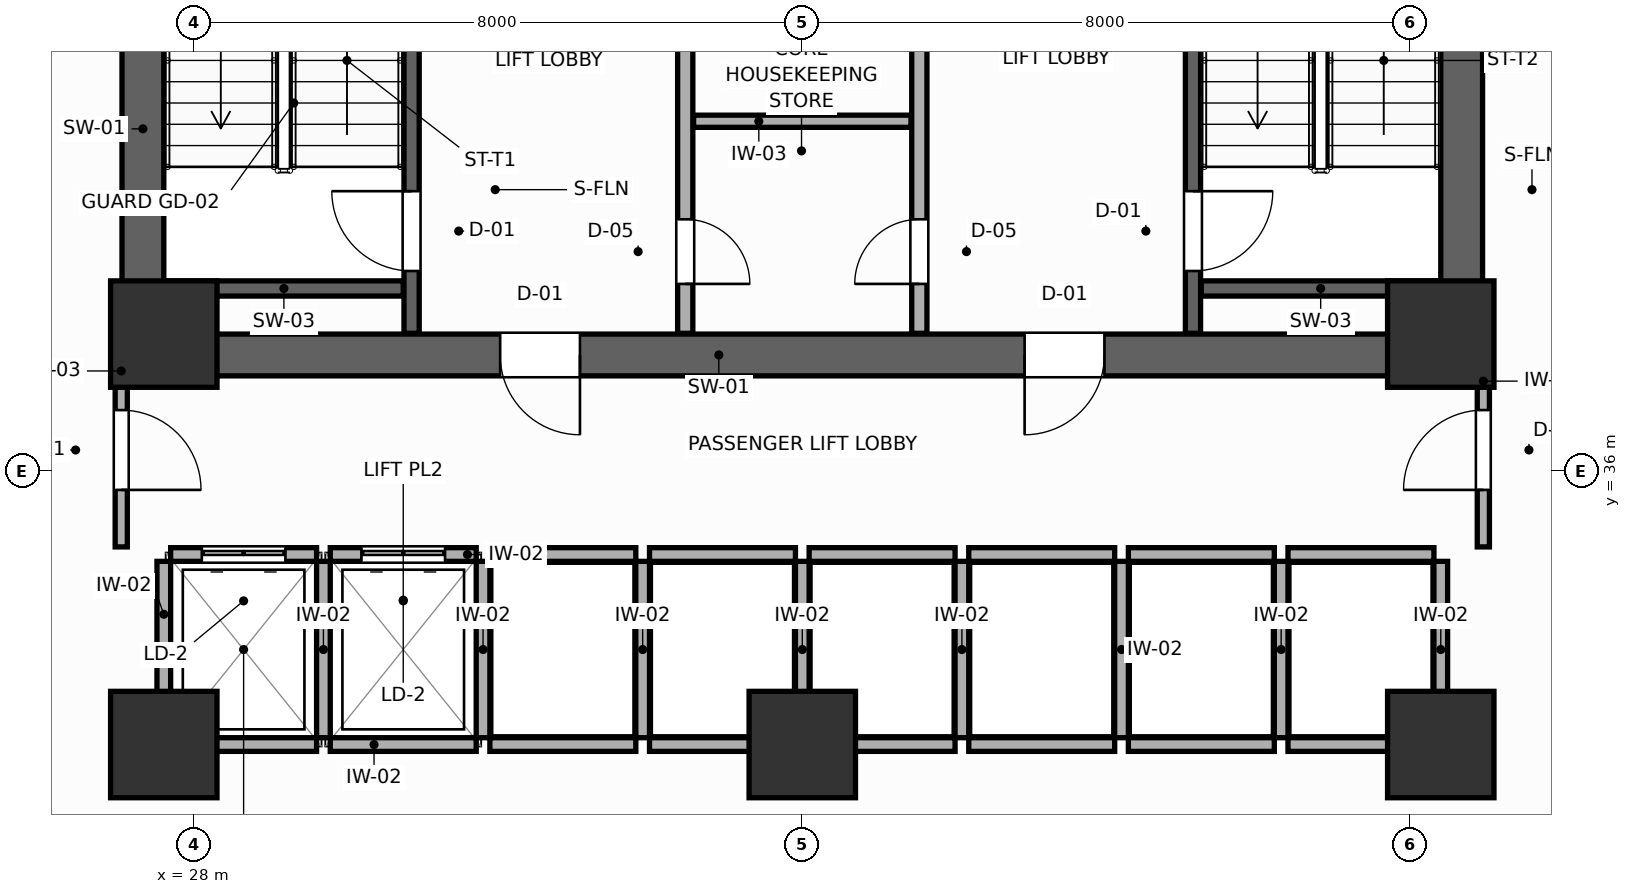
"""IFC4 building model, lengths in metres.
Left out: names, types, materials, properties, quantities, classifications, styles, units other than length and angle.
Written with IfcOpenShell. Run it as: python <this file> out.ifc"""

import sys

from ifc_helpers import new_model, si_unit, direction, frame, frame_2d, origin, origin_2d, place, context, subcontext, project, spatial, rectangle, extrude, source, transform, mapped, element, fill, save


model = new_model("IFC4")
c1 = context("Model", 3, precision=1e-05, world=origin(), true_north=direction((0.0, 1.0)))
c2 = subcontext(c1, "Body", "Model", "MODEL_VIEW")
j1 = project(units=[si_unit("LENGTHUNIT", "METRE"), si_unit("PLANEANGLEUNIT", "RADIAN")], contexts=[c1])
p1 = place(None, origin())
s1 = spatial("IfcSite", under=j1, at=p1, CompositionType="ELEMENT")
p2 = place(p1, origin())
s2 = spatial("IfcBuilding", under=s1, at=p2, CompositionType="ELEMENT")
p3 = place(p2, frame((0.0, 0.0, 83.4)))
s3 = spatial("IfcBuildingStorey", under=s2, at=p3, CompositionType="ELEMENT", Elevation=83.4)
p4 = place(p3, frame((27.05, 37.525, 0.0), z_axis=(0.0, 0.0, 1.0), x_axis=(1.0, 0.0, 0.0)))
e1 = element("IfcWall", 1, at=p4, inside=s3, PredefinedType="SHEAR", context=c2, shape_type="SweptSolid", body=[
    extrude(rectangle(XDim=17.9, YDim=0.55, at=frame_2d((8.95, 0.0))), origin(), (0.0, 0.0, 1.0), 3.9),
])
p5 = place(p4, frame((4.975, 0.0, 0.0)))
e2 = element("IfcOpeningElement", 2, at=p5, cuts=e1, PredefinedType="OPENING", context=c2, shape_type="SweptSolid", body=[
    extrude(rectangle(XDim=1.05, YDim=2.1, at=frame_2d((0.525, 1.05))), frame((0.0, 0.285, 0.0), z_axis=(0.0, -1.0, 0.0), x_axis=(1.0, 0.0, 0.0)), (0.0, 0.0, 1.0), 0.57),
])
p6 = place(p4, frame((11.875, 0.0, 0.0)))
e3 = element("IfcOpeningElement", 3, at=p6, cuts=e1, PredefinedType="OPENING", context=c2, shape_type="SweptSolid", body=[
    extrude(rectangle(XDim=1.05, YDim=2.1, at=frame_2d((0.525, 1.05))), frame((0.0, 0.285, 0.0), z_axis=(0.0, -1.0, 0.0), x_axis=(1.0, 0.0, 0.0)), (0.0, 0.0, 1.0), 0.57),
])
for number, where, z_axis, x_axis in (
    (4, (27.325, 37.8, 0.0), (0.0, 0.0, 1.0), (0.0, 1.0, 0.0)),
    (5, (44.675, 37.8, 0.0), (0.0, 0.0, 1.0), (0.0, 1.0, 0.0)),
):
    element("IfcWall", number, at=place(p3, frame(where, z_axis=z_axis, x_axis=x_axis)), inside=s3, PredefinedType="SHEAR", context=c2, shape_type="SweptSolid", body=[
        extrude(rectangle(XDim=9.0, YDim=0.55, at=frame_2d((4.5, 0.0))), origin(), (0.0, 0.0, 1.0), 3.9),
    ])
m1 = source(origin(), c2, "Body", "SweptSolid", [
    extrude(rectangle(XDim=1.4, YDim=1.4, at=origin_2d()), origin(), (0.0, 0.0, 1.0), 3.9),
])
for number, where, z_axis, x_axis in (
    (6, (27.6, 37.8, 0.0), (0.0, 0.0, 1.0), (1.0, 0.0, 0.0)),
    (7, (44.4, 37.8, 0.0), (0.0, 0.0, 1.0), (1.0, 0.0, 0.0)),
    (8, (27.6, 32.4, 0.0), (0.0, 0.0, 1.0), (1.0, 0.0, 0.0)),
    (9, (44.4, 32.4, 0.0), (0.0, 0.0, 1.0), (1.0, 0.0, 0.0)),
    (10, (36.0, 32.4, 0.0), (0.0, 0.0, 1.0), (1.0, 0.0, 0.0)),
):
    element("IfcColumn", number, at=place(p3, frame(where, z_axis=z_axis, x_axis=x_axis)), inside=s3, PredefinedType="COLUMN", context=c2, shape_type="MappedRepresentation", body=[
        mapped(m1, transform((0.0, 0.0, 0.0), scale=1.0)),
    ])
p7 = place(p3, frame((30.86, 37.81, 0.0), z_axis=(0.0, 0.0, 1.0), x_axis=(0.0, 1.0, 0.0)))
e11 = element("IfcWall", 11, at=p7, inside=s3, PredefinedType="SHEAR", context=c2, shape_type="SweptSolid", body=[
    extrude(rectangle(XDim=8.98, YDim=0.2, at=frame_2d((4.49, 0.0))), origin(), (0.0, 0.0, 1.0), 3.9),
])
p8 = place(p7, frame((0.82, 0.0, 0.0)))
e12 = element("IfcOpeningElement", 12, at=p8, cuts=e11, PredefinedType="OPENING", context=c2, shape_type="SweptSolid", body=[
    extrude(rectangle(XDim=1.05, YDim=2.1, at=frame_2d((0.525, 1.05))), frame((0.0, 0.11, 0.0), z_axis=(0.0, -1.0, 0.0), x_axis=(1.0, 0.0, 0.0)), (0.0, 0.0, 1.0), 0.22),
])
p9 = place(p3, frame((27.61, 38.4, 0.0), z_axis=(0.0, 0.0, 1.0), x_axis=(1.0, 0.0, 0.0)))
e13 = element("IfcWall", 13, at=p9, inside=s3, PredefinedType="SHEAR", context=c2, shape_type="SweptSolid", body=[
    extrude(rectangle(XDim=3.14, YDim=0.2, at=frame_2d((1.57, 0.0))), origin(), (0.0, 0.0, 1.0), 3.9),
])
p10 = place(p3, frame((41.14, 37.81, 0.0), z_axis=(0.0, 0.0, 1.0), x_axis=(0.0, 1.0, 0.0)))
e14 = element("IfcWall", 14, at=p10, inside=s3, PredefinedType="SHEAR", context=c2, shape_type="SweptSolid", body=[
    extrude(rectangle(XDim=8.98, YDim=0.2, at=frame_2d((4.49, 0.0))), origin(), (0.0, 0.0, 1.0), 3.9),
])
p11 = place(p10, frame((0.82, 0.0, 0.0)))
e15 = element("IfcOpeningElement", 15, at=p11, cuts=e14, PredefinedType="OPENING", context=c2, shape_type="SweptSolid", body=[
    extrude(rectangle(XDim=1.05, YDim=2.1, at=frame_2d((0.525, 1.05))), frame((0.0, 0.11, 0.0), z_axis=(0.0, -1.0, 0.0), x_axis=(1.0, 0.0, 0.0)), (0.0, 0.0, 1.0), 0.22),
])
p12 = place(p3, frame((41.25, 38.4, 0.0), z_axis=(0.0, 0.0, 1.0), x_axis=(1.0, 0.0, 0.0)))
e16 = element("IfcWall", 16, at=p12, inside=s3, PredefinedType="SHEAR", context=c2, shape_type="SweptSolid", body=[
    extrude(rectangle(XDim=3.14, YDim=0.2, at=frame_2d((1.57, 0.0))), origin(), (0.0, 0.0, 1.0), 3.9),
])
p13 = place(p3, frame((34.46, 37.81, 0.0), z_axis=(0.0, 0.0, 1.0), x_axis=(0.0, 1.0, 0.0)))
e17 = element("IfcWall", 17, at=p13, inside=s3, PredefinedType="PARTITIONING", context=c2, shape_type="SweptSolid", body=[
    extrude(rectangle(XDim=8.98, YDim=0.2, at=frame_2d((4.49, 0.0))), origin(), (0.0, 0.0, 1.0), 3.68),
])
p14 = place(p13, frame((0.65, 0.0, 0.0)))
e18 = element("IfcOpeningElement", 18, at=p14, cuts=e17, PredefinedType="OPENING", context=c2, shape_type="SweptSolid", body=[
    extrude(rectangle(XDim=0.85, YDim=2.05, at=frame_2d((0.425, 1.025))), frame((0.0, 0.11, 0.0), z_axis=(0.0, -1.0, 0.0), x_axis=(1.0, 0.0, 0.0)), (0.0, 0.0, 1.0), 0.22),
])
p15 = place(p3, frame((37.54, 37.81, 0.0), z_axis=(0.0, 0.0, 1.0), x_axis=(0.0, 1.0, 0.0)))
e19 = element("IfcWall", 19, at=p15, inside=s3, PredefinedType="PARTITIONING", context=c2, shape_type="SweptSolid", body=[
    extrude(rectangle(XDim=8.98, YDim=0.2, at=frame_2d((4.49, 0.0))), origin(), (0.0, 0.0, 1.0), 3.68),
])
p16 = place(p15, frame((0.65, 0.0, 0.0)))
e20 = element("IfcOpeningElement", 20, at=p16, cuts=e19, PredefinedType="OPENING", context=c2, shape_type="SweptSolid", body=[
    extrude(rectangle(XDim=0.85, YDim=2.05, at=frame_2d((0.425, 1.025))), frame((0.0, 0.11, 0.0), z_axis=(0.0, -1.0, 0.0), x_axis=(1.0, 0.0, 0.0)), (0.0, 0.0, 1.0), 0.22),
])
p17 = place(p3, frame((34.57, 40.6, 0.0), z_axis=(0.0, 0.0, 1.0), x_axis=(1.0, 0.0, 0.0)))
e21 = element("IfcWall", 21, at=p17, inside=s3, PredefinedType="PARTITIONING", context=c2, shape_type="SweptSolid", body=[
    extrude(rectangle(XDim=2.86, YDim=0.16, at=frame_2d((1.43, 0.0))), origin(), (0.0, 0.0, 1.0), 3.68),
])
p18 = place(p3, frame((27.69, 34.9, 0.0), z_axis=(0.0, 0.0, 1.0), x_axis=(1.0, 0.0, 0.0)))
e22 = element("IfcWall", 22, at=p18, inside=s3, PredefinedType="PARTITIONING", context=c2, shape_type="SweptSolid", body=[
    extrude(rectangle(XDim=1.92, YDim=0.18, at=frame_2d((0.96, 0.0))), origin(), (0.0, 0.0, 1.0), 3.68),
])
p19 = place(p18, frame((0.41, 0.0, 0.0)))
e23 = element("IfcOpeningElement", 23, at=p19, cuts=e22, PredefinedType="OPENING", context=c2, shape_type="SweptSolid", body=[
    extrude(rectangle(XDim=1.1, YDim=2.1, at=frame_2d((0.55, 1.05))), frame((0.0, 0.1, 0.0), z_axis=(0.0, -1.0, 0.0), x_axis=(1.0, 0.0, 0.0)), (0.0, 0.0, 1.0), 0.2),
])
p20 = place(p3, frame((27.69, 32.4, 0.0), z_axis=(0.0, 0.0, 1.0), x_axis=(1.0, 0.0, 0.0)))
e24 = element("IfcWall", 24, at=p20, inside=s3, PredefinedType="PARTITIONING", context=c2, shape_type="SweptSolid", body=[
    extrude(rectangle(XDim=1.92, YDim=0.18, at=frame_2d((0.96, 0.0))), origin(), (0.0, 0.0, 1.0), 2.24),
])
p21 = place(p3, frame((27.6, 32.49, 0.0), z_axis=(0.0, 0.0, 1.0), x_axis=(0.0, 1.0, 0.0)))
e25 = element("IfcWall", 25, at=p21, inside=s3, PredefinedType="PARTITIONING", context=c2, shape_type="SweptSolid", body=[
    extrude(rectangle(XDim=2.32, YDim=0.18, at=frame_2d((1.16, 0.0))), origin(), (0.0, 0.0, 1.0), 3.68),
])
p22 = place(p3, frame((29.79, 34.9, 0.0), z_axis=(0.0, 0.0, 1.0), x_axis=(1.0, 0.0, 0.0)))
e26 = element("IfcWall", 26, at=p22, inside=s3, PredefinedType="PARTITIONING", context=c2, shape_type="SweptSolid", body=[
    extrude(rectangle(XDim=1.92, YDim=0.18, at=frame_2d((0.96, 0.0))), origin(), (0.0, 0.0, 1.0), 3.68),
])
p23 = place(p22, frame((0.41, 0.0, 0.0)))
e27 = element("IfcOpeningElement", 27, at=p23, cuts=e26, PredefinedType="OPENING", context=c2, shape_type="SweptSolid", body=[
    extrude(rectangle(XDim=1.1, YDim=2.1, at=frame_2d((0.55, 1.05))), frame((0.0, 0.1, 0.0), z_axis=(0.0, -1.0, 0.0), x_axis=(1.0, 0.0, 0.0)), (0.0, 0.0, 1.0), 0.2),
])
p24 = place(p3, frame((29.79, 32.4, 0.0), z_axis=(0.0, 0.0, 1.0), x_axis=(1.0, 0.0, 0.0)))
e28 = element("IfcWall", 28, at=p24, inside=s3, PredefinedType="PARTITIONING", context=c2, shape_type="SweptSolid", body=[
    extrude(rectangle(XDim=1.92, YDim=0.18, at=frame_2d((0.96, 0.0))), origin(), (0.0, 0.0, 1.0), 2.24),
])
p25 = place(p3, frame((29.7, 32.49, 0.0), z_axis=(0.0, 0.0, 1.0), x_axis=(0.0, 1.0, 0.0)))
e29 = element("IfcWall", 29, at=p25, inside=s3, PredefinedType="PARTITIONING", context=c2, shape_type="SweptSolid", body=[
    extrude(rectangle(XDim=2.32, YDim=0.18, at=frame_2d((1.16, 0.0))), origin(), (0.0, 0.0, 1.0), 3.68),
])
p26 = place(p3, frame((31.89, 34.9, 0.0), z_axis=(0.0, 0.0, 1.0), x_axis=(1.0, 0.0, 0.0)))
e30 = element("IfcWall", 30, at=p26, inside=s3, PredefinedType="PARTITIONING", context=c2, shape_type="SweptSolid", body=[
    extrude(rectangle(XDim=1.92, YDim=0.18, at=frame_2d((0.96, 0.0))), origin(), (0.0, 0.0, 1.0), 3.68),
])
p27 = place(p3, frame((31.89, 32.4, 0.0), z_axis=(0.0, 0.0, 1.0), x_axis=(1.0, 0.0, 0.0)))
e31 = element("IfcWall", 31, at=p27, inside=s3, PredefinedType="PARTITIONING", context=c2, shape_type="SweptSolid", body=[
    extrude(rectangle(XDim=1.92, YDim=0.18, at=frame_2d((0.96, 0.0))), origin(), (0.0, 0.0, 1.0), 2.24),
])
p28 = place(p3, frame((31.8, 32.49, 0.0), z_axis=(0.0, 0.0, 1.0), x_axis=(0.0, 1.0, 0.0)))
e32 = element("IfcWall", 32, at=p28, inside=s3, PredefinedType="PARTITIONING", context=c2, shape_type="SweptSolid", body=[
    extrude(rectangle(XDim=2.32, YDim=0.18, at=frame_2d((1.16, 0.0))), origin(), (0.0, 0.0, 1.0), 3.68),
])
p29 = place(p3, frame((33.99, 34.9, 0.0), z_axis=(0.0, 0.0, 1.0), x_axis=(1.0, 0.0, 0.0)))
e33 = element("IfcWall", 33, at=p29, inside=s3, PredefinedType="PARTITIONING", context=c2, shape_type="SweptSolid", body=[
    extrude(rectangle(XDim=1.92, YDim=0.18, at=frame_2d((0.96, 0.0))), origin(), (0.0, 0.0, 1.0), 3.68),
])
p30 = place(p3, frame((33.99, 32.4, 0.0), z_axis=(0.0, 0.0, 1.0), x_axis=(1.0, 0.0, 0.0)))
e34 = element("IfcWall", 34, at=p30, inside=s3, PredefinedType="PARTITIONING", context=c2, shape_type="SweptSolid", body=[
    extrude(rectangle(XDim=1.92, YDim=0.18, at=frame_2d((0.96, 0.0))), origin(), (0.0, 0.0, 1.0), 2.24),
])
p31 = place(p3, frame((33.9, 32.49, 0.0), z_axis=(0.0, 0.0, 1.0), x_axis=(0.0, 1.0, 0.0)))
e35 = element("IfcWall", 35, at=p31, inside=s3, PredefinedType="PARTITIONING", context=c2, shape_type="SweptSolid", body=[
    extrude(rectangle(XDim=2.32, YDim=0.18, at=frame_2d((1.16, 0.0))), origin(), (0.0, 0.0, 1.0), 3.68),
])
p32 = place(p3, frame((36.09, 34.9, 0.0), z_axis=(0.0, 0.0, 1.0), x_axis=(1.0, 0.0, 0.0)))
e36 = element("IfcWall", 36, at=p32, inside=s3, PredefinedType="PARTITIONING", context=c2, shape_type="SweptSolid", body=[
    extrude(rectangle(XDim=1.92, YDim=0.18, at=frame_2d((0.96, 0.0))), origin(), (0.0, 0.0, 1.0), 3.68),
])
p33 = place(p3, frame((36.09, 32.4, 0.0), z_axis=(0.0, 0.0, 1.0), x_axis=(1.0, 0.0, 0.0)))
e37 = element("IfcWall", 37, at=p33, inside=s3, PredefinedType="PARTITIONING", context=c2, shape_type="SweptSolid", body=[
    extrude(rectangle(XDim=1.92, YDim=0.18, at=frame_2d((0.96, 0.0))), origin(), (0.0, 0.0, 1.0), 2.24),
])
p34 = place(p3, frame((36.0, 32.49, 0.0), z_axis=(0.0, 0.0, 1.0), x_axis=(0.0, 1.0, 0.0)))
e38 = element("IfcWall", 38, at=p34, inside=s3, PredefinedType="PARTITIONING", context=c2, shape_type="SweptSolid", body=[
    extrude(rectangle(XDim=2.32, YDim=0.18, at=frame_2d((1.16, 0.0))), origin(), (0.0, 0.0, 1.0), 3.68),
])
p35 = place(p3, frame((38.19, 34.9, 0.0), z_axis=(0.0, 0.0, 1.0), x_axis=(1.0, 0.0, 0.0)))
e39 = element("IfcWall", 39, at=p35, inside=s3, PredefinedType="PARTITIONING", context=c2, shape_type="SweptSolid", body=[
    extrude(rectangle(XDim=1.92, YDim=0.18, at=frame_2d((0.96, 0.0))), origin(), (0.0, 0.0, 1.0), 3.68),
])
p36 = place(p3, frame((38.19, 32.4, 0.0), z_axis=(0.0, 0.0, 1.0), x_axis=(1.0, 0.0, 0.0)))
e40 = element("IfcWall", 40, at=p36, inside=s3, PredefinedType="PARTITIONING", context=c2, shape_type="SweptSolid", body=[
    extrude(rectangle(XDim=1.92, YDim=0.18, at=frame_2d((0.96, 0.0))), origin(), (0.0, 0.0, 1.0), 2.24),
])
p37 = place(p3, frame((38.1, 32.49, 0.0), z_axis=(0.0, 0.0, 1.0), x_axis=(0.0, 1.0, 0.0)))
e41 = element("IfcWall", 41, at=p37, inside=s3, PredefinedType="PARTITIONING", context=c2, shape_type="SweptSolid", body=[
    extrude(rectangle(XDim=2.32, YDim=0.18, at=frame_2d((1.16, 0.0))), origin(), (0.0, 0.0, 1.0), 3.68),
])
p38 = place(p3, frame((40.29, 34.9, 0.0), z_axis=(0.0, 0.0, 1.0), x_axis=(1.0, 0.0, 0.0)))
e42 = element("IfcWall", 42, at=p38, inside=s3, PredefinedType="PARTITIONING", context=c2, shape_type="SweptSolid", body=[
    extrude(rectangle(XDim=1.92, YDim=0.18, at=frame_2d((0.96, 0.0))), origin(), (0.0, 0.0, 1.0), 3.68),
])
p39 = place(p3, frame((40.29, 32.4, 0.0), z_axis=(0.0, 0.0, 1.0), x_axis=(1.0, 0.0, 0.0)))
e43 = element("IfcWall", 43, at=p39, inside=s3, PredefinedType="PARTITIONING", context=c2, shape_type="SweptSolid", body=[
    extrude(rectangle(XDim=1.92, YDim=0.18, at=frame_2d((0.96, 0.0))), origin(), (0.0, 0.0, 1.0), 2.24),
])
p40 = place(p3, frame((40.2, 32.49, 0.0), z_axis=(0.0, 0.0, 1.0), x_axis=(0.0, 1.0, 0.0)))
e44 = element("IfcWall", 44, at=p40, inside=s3, PredefinedType="PARTITIONING", context=c2, shape_type="SweptSolid", body=[
    extrude(rectangle(XDim=2.32, YDim=0.18, at=frame_2d((1.16, 0.0))), origin(), (0.0, 0.0, 1.0), 3.68),
])
p41 = place(p3, frame((42.39, 34.9, 0.0), z_axis=(0.0, 0.0, 1.0), x_axis=(1.0, 0.0, 0.0)))
e45 = element("IfcWall", 45, at=p41, inside=s3, PredefinedType="PARTITIONING", context=c2, shape_type="SweptSolid", body=[
    extrude(rectangle(XDim=1.92, YDim=0.18, at=frame_2d((0.96, 0.0))), origin(), (0.0, 0.0, 1.0), 3.68),
])
p42 = place(p3, frame((42.39, 32.4, 0.0), z_axis=(0.0, 0.0, 1.0), x_axis=(1.0, 0.0, 0.0)))
e46 = element("IfcWall", 46, at=p42, inside=s3, PredefinedType="PARTITIONING", context=c2, shape_type="SweptSolid", body=[
    extrude(rectangle(XDim=1.92, YDim=0.18, at=frame_2d((0.96, 0.0))), origin(), (0.0, 0.0, 1.0), 2.24),
])
for number, where, z_axis, x_axis in (
    (47, (42.3, 32.49, 0.0), (0.0, 0.0, 1.0), (0.0, 1.0, 0.0)),
    (48, (44.4, 32.49, 0.0), (0.0, 0.0, 1.0), (0.0, 1.0, 0.0)),
):
    element("IfcWall", number, at=place(p3, frame(where, z_axis=z_axis, x_axis=x_axis)), inside=s3, PredefinedType="PARTITIONING", context=c2, shape_type="SweptSolid", body=[
        extrude(rectangle(XDim=2.32, YDim=0.18, at=frame_2d((1.16, 0.0))), origin(), (0.0, 0.0, 1.0), 3.68),
    ])
p43 = place(p3, frame((27.04, 35.0, 0.0), z_axis=(0.0, 0.0, 1.0), x_axis=(0.0, 1.0, 0.0)))
e49 = element("IfcWall", 49, at=p43, inside=s3, PredefinedType="PARTITIONING", context=c2, shape_type="SweptSolid", body=[
    extrude(rectangle(XDim=2.65, YDim=0.16, at=frame_2d((1.325, 0.0))), origin(), (0.0, 0.0, 1.0), 3.68),
])
p44 = place(p43, frame((0.75, 0.0, 0.0)))
e50 = element("IfcOpeningElement", 50, at=p44, cuts=e49, PredefinedType="OPENING", context=c2, shape_type="SweptSolid", body=[
    extrude(rectangle(XDim=1.05, YDim=2.1, at=frame_2d((0.525, 1.05))), frame((0.0, 0.09, 0.0), z_axis=(0.0, -1.0, 0.0), x_axis=(1.0, 0.0, 0.0)), (0.0, 0.0, 1.0), 0.18),
])
p45 = place(p3, frame((44.96, 35.0, 0.0), z_axis=(0.0, 0.0, 1.0), x_axis=(0.0, 1.0, 0.0)))
e51 = element("IfcWall", 51, at=p45, inside=s3, PredefinedType="PARTITIONING", context=c2, shape_type="SweptSolid", body=[
    extrude(rectangle(XDim=2.65, YDim=0.16, at=frame_2d((1.325, 0.0))), origin(), (0.0, 0.0, 1.0), 3.68),
])
p46 = place(p45, frame((0.75, 0.0, 0.0)))
e52 = element("IfcOpeningElement", 52, at=p46, cuts=e51, PredefinedType="OPENING", context=c2, shape_type="SweptSolid", body=[
    extrude(rectangle(XDim=1.05, YDim=2.1, at=frame_2d((0.525, 1.05))), frame((0.0, 0.09, 0.0), z_axis=(0.0, -1.0, 0.0), x_axis=(1.0, 0.0, 0.0)), (0.0, 0.0, 1.0), 0.18),
])
p47 = place(p8, origin())
e53 = element("IfcDoor", 53, at=p47, inside=s3, OperationType="SINGLE_SWING_RIGHT", PredefinedType="DOOR", context=c2, shape_type="SweptSolid", body=[
    extrude(rectangle(XDim=1.05, YDim=2.1, at=frame_2d((0.525, 1.05))), frame((0.0, 0.025, 0.0), z_axis=(0.0, -1.0, 0.0), x_axis=(1.0, 0.0, 0.0)), (0.0, 0.0, 1.0), 0.05),
])
fill(e12, e53)
p48 = place(p11, frame((1.05, 0.0, 0.0), z_axis=(0.0, 0.0, 1.0), x_axis=(-1.0, 0.0, 0.0)))
e54 = element("IfcDoor", 54, at=p48, inside=s3, OperationType="SINGLE_SWING_LEFT", PredefinedType="DOOR", context=c2, shape_type="SweptSolid", body=[
    extrude(rectangle(XDim=1.05, YDim=2.1, at=frame_2d((0.525, 1.05))), frame((0.0, 0.025, 0.0), z_axis=(0.0, -1.0, 0.0), x_axis=(1.0, 0.0, 0.0)), (0.0, 0.0, 1.0), 0.05),
])
fill(e15, e54)
p49 = place(p14, frame((0.85, 0.0, 0.0), z_axis=(0.0, 0.0, 1.0), x_axis=(-1.0, 0.0, 0.0)))
e55 = element("IfcDoor", 55, at=p49, inside=s3, OperationType="SINGLE_SWING_RIGHT", PredefinedType="DOOR", context=c2, shape_type="SweptSolid", body=[
    extrude(rectangle(XDim=0.85, YDim=2.05, at=frame_2d((0.425, 1.025))), frame((0.0, 0.025, 0.0), z_axis=(0.0, -1.0, 0.0), x_axis=(1.0, 0.0, 0.0)), (0.0, 0.0, 1.0), 0.05),
])
fill(e18, e55)
p50 = place(p16, origin())
e56 = element("IfcDoor", 56, at=p50, inside=s3, OperationType="SINGLE_SWING_LEFT", PredefinedType="DOOR", context=c2, shape_type="SweptSolid", body=[
    extrude(rectangle(XDim=0.85, YDim=2.05, at=frame_2d((0.425, 1.025))), frame((0.0, 0.025, 0.0), z_axis=(0.0, -1.0, 0.0), x_axis=(1.0, 0.0, 0.0)), (0.0, 0.0, 1.0), 0.05),
])
fill(e20, e56)
p51 = place(p19, origin())
e57 = element("IfcDoor", 57, at=p51, inside=s3, OperationType="DOUBLE_DOOR_SLIDING", PredefinedType="DOOR", context=c2, shape_type="SweptSolid", body=[
    extrude(rectangle(XDim=1.1, YDim=2.1, at=frame_2d((0.55, 1.05))), frame((0.0, 0.025, 0.0), z_axis=(0.0, -1.0, 0.0), x_axis=(1.0, 0.0, 0.0)), (0.0, 0.0, 1.0), 0.05),
])
fill(e23, e57)
p52 = place(p23, origin())
e58 = element("IfcDoor", 58, at=p52, inside=s3, OperationType="DOUBLE_DOOR_SLIDING", PredefinedType="DOOR", context=c2, shape_type="SweptSolid", body=[
    extrude(rectangle(XDim=1.1, YDim=2.1, at=frame_2d((0.55, 1.05))), frame((0.0, 0.025, 0.0), z_axis=(0.0, -1.0, 0.0), x_axis=(1.0, 0.0, 0.0)), (0.0, 0.0, 1.0), 0.05),
])
fill(e27, e58)
p53 = place(p44, frame((1.05, 0.0, 0.0), z_axis=(0.0, 0.0, 1.0), x_axis=(-1.0, 0.0, 0.0)))
e59 = element("IfcDoor", 59, at=p53, inside=s3, OperationType="SINGLE_SWING_RIGHT", PredefinedType="DOOR", context=c2, shape_type="SweptSolid", body=[
    extrude(rectangle(XDim=1.05, YDim=2.1, at=frame_2d((0.525, 1.05))), frame((0.0, 0.025, 0.0), z_axis=(0.0, -1.0, 0.0), x_axis=(1.0, 0.0, 0.0)), (0.0, 0.0, 1.0), 0.05),
])
fill(e50, e59)
p54 = place(p46, origin())
e60 = element("IfcDoor", 60, at=p54, inside=s3, OperationType="SINGLE_SWING_LEFT", PredefinedType="DOOR", context=c2, shape_type="SweptSolid", body=[
    extrude(rectangle(XDim=1.05, YDim=2.1, at=frame_2d((0.525, 1.05))), frame((0.0, 0.025, 0.0), z_axis=(0.0, -1.0, 0.0), x_axis=(1.0, 0.0, 0.0)), (0.0, 0.0, 1.0), 0.05),
])
fill(e52, e60)
p55 = place(p5, frame((1.05, 0.0, 0.0), z_axis=(0.0, 0.0, 1.0), x_axis=(-1.0, 0.0, 0.0)))
e61 = element("IfcDoor", 61, at=p55, inside=s3, OperationType="SINGLE_SWING_LEFT", PredefinedType="DOOR", context=c2, shape_type="SweptSolid", body=[
    extrude(rectangle(XDim=1.05, YDim=2.1, at=frame_2d((0.525, 1.05))), frame((0.0, 0.025, 0.0), z_axis=(0.0, -1.0, 0.0), x_axis=(1.0, 0.0, 0.0)), (0.0, 0.0, 1.0), 0.05),
])
fill(e2, e61)
p56 = place(p6, frame((1.05, 0.0, 0.0), z_axis=(0.0, 0.0, 1.0), x_axis=(-1.0, 0.0, 0.0)))
e62 = element("IfcDoor", 62, at=p56, inside=s3, OperationType="SINGLE_SWING_RIGHT", PredefinedType="DOOR", context=c2, shape_type="SweptSolid", body=[
    extrude(rectangle(XDim=1.05, YDim=2.1, at=frame_2d((0.525, 1.05))), frame((0.0, 0.025, 0.0), z_axis=(0.0, -1.0, 0.0), x_axis=(1.0, 0.0, 0.0)), (0.0, 0.0, 1.0), 0.05),
])
fill(e3, e62)
save(model, sys.argv[1])
